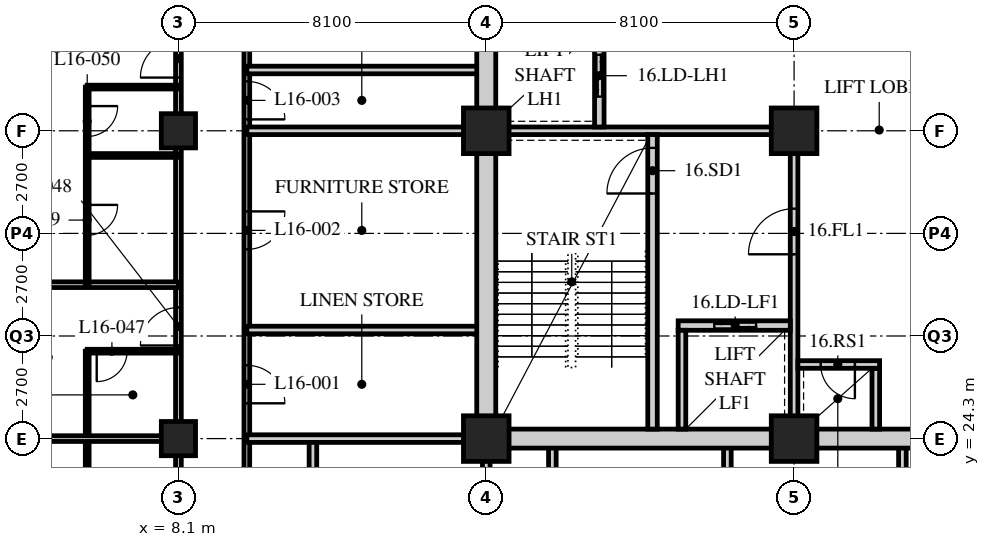
"""IFC4 building model, lengths in metres.
Left out: names, types, materials, properties, quantities, classifications, styles, units other than length and angle.
Written with IfcOpenShell. Run it as: python <this file> out.ifc"""

import sys

from ifc_helpers import new_model, si_unit, direction, frame, frame_2d, origin, origin_2d, place, context, subcontext, project, spatial, rectangle, hollow_rectangle, extrude, element, fill, save


model = new_model("IFC4")
c1 = context("Model", 3, precision=1e-05, world=origin(), true_north=direction((0.0, 1.0)))
c2 = subcontext(c1, "Body", "Model", "MODEL_VIEW")
j1 = project(units=[si_unit("LENGTHUNIT", "METRE"), si_unit("PLANEANGLEUNIT", "RADIAN")], contexts=[c1])
p1 = place(None, origin())
s1 = spatial("IfcSite", under=j1, at=p1, CompositionType="ELEMENT")
p2 = place(p1, origin())
s2 = spatial("IfcBuilding", under=s1, at=p2, CompositionType="ELEMENT")
p3 = place(p2, frame((0.0, 0.0, 67.0)))
s3 = spatial("IfcBuildingStorey", under=s2, at=p3, CompositionType="ELEMENT", Elevation=67.0)
for number, where, z_axis, x_axis in (
    (1, (8.1, 24.3, 0.0), (0.0, 0.0, 1.0), (1.0, 0.0, 0.0)),
    (2, (8.1, 32.4, 0.0), (0.0, 0.0, 1.0), (1.0, 0.0, 0.0)),
):
    element("IfcColumn", number, at=place(p3, frame(where, z_axis=z_axis, x_axis=x_axis)), inside=s3, PredefinedType="COLUMN", context=c2, shape_type="SweptSolid", body=[
        extrude(hollow_rectangle(XDim=0.9, YDim=0.9, WallThickness=0.09, at=origin_2d()), origin(), (0.0, 0.0, 1.0), 3.4),
    ])
for number, where, z_axis, x_axis in (
    (3, (16.2, 24.3, 0.0), (0.0, 0.0, 1.0), (1.0, 0.0, 0.0)),
    (4, (16.2, 32.4, 0.0), (0.0, 0.0, 1.0), (1.0, 0.0, 0.0)),
    (5, (24.3, 24.3, 0.0), (0.0, 0.0, 1.0), (1.0, 0.0, 0.0)),
    (6, (24.3, 32.4, 0.0), (0.0, 0.0, 1.0), (1.0, 0.0, 0.0)),
):
    element("IfcColumn", number, at=place(p3, frame(where, z_axis=z_axis, x_axis=x_axis)), inside=s3, PredefinedType="COLUMN", context=c2, shape_type="SweptSolid", body=[
        extrude(hollow_rectangle(XDim=1.2, YDim=1.2, WallThickness=0.12, at=origin_2d()), origin(), (0.0, 0.0, 1.0), 3.4),
    ])
p4 = place(p3, frame((8.1, 12.15, 0.0), z_axis=(0.0, 0.0, 1.0), x_axis=(0.0, 1.0, 0.0)))
e7 = element("IfcWall", 7, at=p4, inside=s3, PredefinedType="PARTITIONING", context=c2, shape_type="SweptSolid", body=[
    extrude(rectangle(XDim=30.15, YDim=0.15, at=frame_2d((15.075, 0.0))), origin(), (0.0, 0.0, 1.0), 2.578),
])
p5 = place(p4, frame((0.6, 0.0, 0.0)))
e8 = element("IfcOpeningElement", 8, at=p5, cuts=e7, PredefinedType="OPENING", context=c2, shape_type="SweptSolid", body=[
    extrude(rectangle(XDim=1.0, YDim=2.1, at=frame_2d((0.5, 1.05))), frame((0.0, 0.085, 0.0), z_axis=(0.0, -1.0, 0.0), x_axis=(1.0, 0.0, 0.0)), (0.0, 0.0, 1.0), 0.17),
])
p6 = place(p4, frame((6.8, 0.0, 0.0)))
e9 = element("IfcOpeningElement", 9, at=p6, cuts=e7, PredefinedType="OPENING", context=c2, shape_type="SweptSolid", body=[
    extrude(rectangle(XDim=1.0, YDim=2.1, at=frame_2d((0.5, 1.05))), frame((0.0, 0.085, 0.0), z_axis=(0.0, -1.0, 0.0), x_axis=(1.0, 0.0, 0.0)), (0.0, 0.0, 1.0), 0.17),
])
p7 = place(p4, frame((8.7, 0.0, 0.0)))
e10 = element("IfcOpeningElement", 10, at=p7, cuts=e7, PredefinedType="OPENING", context=c2, shape_type="SweptSolid", body=[
    extrude(rectangle(XDim=1.0, YDim=2.1, at=frame_2d((0.5, 1.05))), frame((0.0, 0.085, 0.0), z_axis=(0.0, -1.0, 0.0), x_axis=(1.0, 0.0, 0.0)), (0.0, 0.0, 1.0), 0.17),
])
p8 = place(p4, frame((14.6, 0.0, 0.0)))
e11 = element("IfcOpeningElement", 11, at=p8, cuts=e7, PredefinedType="OPENING", context=c2, shape_type="SweptSolid", body=[
    extrude(rectangle(XDim=1.0, YDim=2.1, at=frame_2d((0.5, 1.05))), frame((0.0, 0.085, 0.0), z_axis=(0.0, -1.0, 0.0), x_axis=(1.0, 0.0, 0.0)), (0.0, 0.0, 1.0), 0.17),
])
p9 = place(p4, frame((21.65, 0.0, 0.0)))
e12 = element("IfcOpeningElement", 12, at=p9, cuts=e7, PredefinedType="OPENING", context=c2, shape_type="SweptSolid", body=[
    extrude(rectangle(XDim=1.0, YDim=2.1, at=frame_2d((0.5, 1.05))), frame((0.0, 0.085, 0.0), z_axis=(0.0, -1.0, 0.0), x_axis=(1.0, 0.0, 0.0)), (0.0, 0.0, 1.0), 0.17),
])
p10 = place(p4, frame((26.75, 0.0, 0.0)))
e13 = element("IfcOpeningElement", 13, at=p10, cuts=e7, PredefinedType="OPENING", context=c2, shape_type="SweptSolid", body=[
    extrude(rectangle(XDim=1.0, YDim=2.1, at=frame_2d((0.5, 1.05))), frame((0.0, 0.085, 0.0), z_axis=(0.0, -1.0, 0.0), x_axis=(1.0, 0.0, 0.0)), (0.0, 0.0, 1.0), 0.17),
])
p11 = place(p3, frame((9.9, 40.5, 0.0), z_axis=(0.0, 0.0, 1.0), x_axis=(0.0, -1.0, 0.0)))
e14 = element("IfcWall", 14, at=p11, inside=s3, PredefinedType="PARTITIONING", context=c2, shape_type="SweptSolid", body=[
    extrude(rectangle(XDim=26.55, YDim=0.15, at=frame_2d((13.275, 0.0))), origin(), (0.0, 0.0, 1.0), 3.19),
])
p12 = place(p11, frame((14.271, 0.0, 0.0)))
e15 = element("IfcOpeningElement", 15, at=p12, cuts=e14, PredefinedType="OPENING", context=c2, shape_type="SweptSolid", body=[
    extrude(rectangle(XDim=1.0, YDim=2.1, at=frame_2d((0.5, 1.05))), frame((0.0, 0.085, 0.0), z_axis=(0.0, -1.0, 0.0), x_axis=(1.0, 0.0, 0.0)), (0.0, 0.0, 1.0), 0.17),
])
p13 = place(p11, frame((10.221, 0.0, 0.0)))
e16 = element("IfcOpeningElement", 16, at=p13, cuts=e14, PredefinedType="OPENING", context=c2, shape_type="SweptSolid", body=[
    extrude(rectangle(XDim=1.0, YDim=2.1, at=frame_2d((0.5, 1.05))), frame((0.0, 0.085, 0.0), z_axis=(0.0, -1.0, 0.0), x_axis=(1.0, 0.0, 0.0)), (0.0, 0.0, 1.0), 0.17),
])
p14 = place(p11, frame((6.8, 0.0, 0.0)))
e17 = element("IfcOpeningElement", 17, at=p14, cuts=e14, PredefinedType="OPENING", context=c2, shape_type="SweptSolid", body=[
    extrude(rectangle(XDim=1.0, YDim=2.1, at=frame_2d((0.5, 1.05))), frame((0.0, 0.085, 0.0), z_axis=(0.0, -1.0, 0.0), x_axis=(1.0, 0.0, 0.0)), (0.0, 0.0, 1.0), 0.17),
])
p15 = place(p11, frame((2.75, 0.0, 0.0)))
e18 = element("IfcOpeningElement", 18, at=p15, cuts=e14, PredefinedType="OPENING", context=c2, shape_type="SweptSolid", body=[
    extrude(rectangle(XDim=1.0, YDim=2.1, at=frame_2d((0.5, 1.05))), frame((0.0, 0.085, 0.0), z_axis=(0.0, -1.0, 0.0), x_axis=(1.0, 0.0, 0.0)), (0.0, 0.0, 1.0), 0.17),
])
p16 = place(p3, frame((9.9, 32.4, 0.0), z_axis=(0.0, 0.0, 1.0), x_axis=(1.0, 0.0, 0.0)))
e19 = element("IfcWall", 19, at=p16, inside=s3, PredefinedType="SOLIDWALL", context=c2, shape_type="SweptSolid", body=[
    extrude(rectangle(XDim=6.3, YDim=0.2, at=frame_2d((3.15, 0.0))), origin(), (0.0, 0.0, 1.0), 2.578),
])
for number, where, z_axis, x_axis in (
    (20, (9.9, 27.157, 0.0), (0.0, 0.0, 1.0), (1.0, 0.0, 0.0)),
    (21, (9.9, 34.0, 0.0), (0.0, 0.0, 1.0), (1.0, 0.0, 0.0)),
):
    element("IfcWall", number, at=place(p3, frame(where, z_axis=z_axis, x_axis=x_axis)), inside=s3, PredefinedType="SOLIDWALL", context=c2, shape_type="SweptSolid", body=[
        extrude(rectangle(XDim=6.3, YDim=0.2, at=frame_2d((3.15, 0.0))), origin(), (0.0, 0.0, 1.0), 3.19),
    ])
p17 = place(p3, frame((16.2, 13.95, 0.0), z_axis=(0.0, 0.0, 1.0), x_axis=(0.0, 1.0, 0.0)))
e22 = element("IfcWall", 22, at=p17, inside=s3, PredefinedType="SOLIDWALL", context=c2, shape_type="SweptSolid", body=[
    extrude(rectangle(XDim=10.35, YDim=0.2, at=frame_2d((5.175, 0.0))), origin(), (0.0, 0.0, 1.0), 2.578),
])
for number, where, z_axis, x_axis in (
    (23, (11.639, 13.95, 0.0), (0.0, 0.0, 1.0), (0.0, 1.0, 0.0)),
    (24, (17.939, 13.95, 0.0), (0.0, 0.0, 1.0), (0.0, 1.0, 0.0)),
    (25, (22.545, 13.95, 0.0), (0.0, 0.0, 1.0), (0.0, 1.0, 0.0)),
    (26, (27.15, 13.95, 0.0), (0.0, 0.0, 1.0), (0.0, 1.0, 0.0)),
):
    element("IfcWall", number, at=place(p3, frame(where, z_axis=z_axis, x_axis=x_axis)), inside=s3, PredefinedType="SOLIDWALL", context=c2, shape_type="SweptSolid", body=[
        extrude(rectangle(XDim=10.35, YDim=0.2, at=frame_2d((5.175, 0.0))), origin(), (0.0, 0.0, 1.0), 3.19),
    ])
p18 = place(p3, frame((9.9, 24.3, 0.0), z_axis=(0.0, 0.0, 1.0), x_axis=(1.0, 0.0, 0.0)))
e27 = element("IfcWall", 27, at=p18, inside=s3, PredefinedType="SOLIDWALL", context=c2, shape_type="SweptSolid", body=[
    extrude(rectangle(XDim=6.3, YDim=0.2, at=frame_2d((3.15, 0.0))), origin(), (0.0, 0.0, 1.0), 2.578),
])
p19 = place(p3, frame((5.7, 22.0, 0.0), z_axis=(0.0, 0.0, 1.0), x_axis=(0.0, 1.0, 0.0)))
e28 = element("IfcWall", 28, at=p19, inside=s3, PredefinedType="PARTITIONING", context=c2, shape_type="SweptSolid", body=[
    extrude(rectangle(XDim=4.6, YDim=0.1, at=frame_2d((2.3, 0.0))), origin(), (0.0, 0.0, 1.0), 3.19),
])
p20 = place(p3, frame((8.1, 24.3, 0.0), z_axis=(0.0, 0.0, 1.0), x_axis=(-1.0, 0.0, 0.0)))
e29 = element("IfcWall", 29, at=p20, inside=s3, PredefinedType="PARTITIONING", context=c2, shape_type="SweptSolid", body=[
    extrude(rectangle(XDim=7.8, YDim=0.15, at=frame_2d((3.9, 0.0))), origin(), (0.0, 0.0, 1.0), 2.578),
])
p21 = place(p3, frame((8.1, 26.6, 0.0), z_axis=(0.0, 0.0, 1.0), x_axis=(-1.0, 0.0, 0.0)))
e30 = element("IfcWall", 30, at=p21, inside=s3, PredefinedType="PARTITIONING", context=c2, shape_type="SweptSolid", body=[
    extrude(rectangle(XDim=2.4, YDim=0.1, at=frame_2d((1.2, 0.0))), origin(), (0.0, 0.0, 1.0), 3.19),
])
p22 = place(p21, frame((1.35, 0.0, 0.0)))
e31 = element("IfcOpeningElement", 31, at=p22, cuts=e30, PredefinedType="OPENING", context=c2, shape_type="SweptSolid", body=[
    extrude(rectangle(XDim=0.8, YDim=2.1, at=frame_2d((0.4, 1.05))), frame((0.0, 0.06, 0.0), z_axis=(0.0, -1.0, 0.0), x_axis=(1.0, 0.0, 0.0)), (0.0, 0.0, 1.0), 0.12),
])
p23 = place(p3, frame((8.1, 28.35, 0.0), z_axis=(0.0, 0.0, 1.0), x_axis=(-1.0, 0.0, 0.0)))
e32 = element("IfcWall", 32, at=p23, inside=s3, PredefinedType="PARTITIONING", context=c2, shape_type="SweptSolid", body=[
    extrude(rectangle(XDim=7.8, YDim=0.15, at=frame_2d((3.9, 0.0))), origin(), (0.0, 0.0, 1.0), 3.19),
])
p24 = place(p3, frame((5.7, 28.35, 0.0), z_axis=(0.0, 0.0, 1.0), x_axis=(0.0, 1.0, 0.0)))
e33 = element("IfcWall", 33, at=p24, inside=s3, PredefinedType="PARTITIONING", context=c2, shape_type="SweptSolid", body=[
    extrude(rectangle(XDim=5.2, YDim=0.1, at=frame_2d((2.6, 0.0))), origin(), (0.0, 0.0, 1.0), 3.19),
])
p25 = place(p24, frame((1.3, 0.0, 0.0)))
e34 = element("IfcOpeningElement", 34, at=p25, cuts=e33, PredefinedType="OPENING", context=c2, shape_type="SweptSolid", body=[
    extrude(rectangle(XDim=0.8, YDim=2.1, at=frame_2d((0.4, 1.05))), frame((0.0, 0.06, 0.0), z_axis=(0.0, -1.0, 0.0), x_axis=(1.0, 0.0, 0.0)), (0.0, 0.0, 1.0), 0.12),
])
p26 = place(p24, frame((3.9, 0.0, 0.0)))
e35 = element("IfcOpeningElement", 35, at=p26, cuts=e33, PredefinedType="OPENING", context=c2, shape_type="SweptSolid", body=[
    extrude(rectangle(XDim=0.8, YDim=2.1, at=frame_2d((0.4, 1.05))), frame((0.0, 0.06, 0.0), z_axis=(0.0, -1.0, 0.0), x_axis=(1.0, 0.0, 0.0)), (0.0, 0.0, 1.0), 0.12),
])
for number, where, z_axis, x_axis in (
    (36, (8.1, 31.75, 0.0), (0.0, 0.0, 1.0), (-1.0, 0.0, 0.0)),
    (37, (8.1, 33.55, 0.0), (0.0, 0.0, 1.0), (-1.0, 0.0, 0.0)),
):
    element("IfcWall", number, at=place(p3, frame(where, z_axis=z_axis, x_axis=x_axis)), inside=s3, PredefinedType="PARTITIONING", context=c2, shape_type="SweptSolid", body=[
        extrude(rectangle(XDim=2.4, YDim=0.1, at=frame_2d((1.2, 0.0))), origin(), (0.0, 0.0, 1.0), 3.19),
    ])
p27 = place(p3, frame((15.95, 24.3, 0.0), z_axis=(0.0, 0.0, 1.0), x_axis=(1.0, 0.0, 0.0)))
e38 = element("IfcWall", 38, at=p27, inside=s3, PredefinedType="SOLIDWALL", context=c2, shape_type="SweptSolid", body=[
    extrude(rectangle(XDim=24.8, YDim=0.5, at=frame_2d((12.4, 0.0))), origin(), (0.0, 0.0, 1.0), 2.54),
])
p28 = place(p27, frame((11.5, 0.0, 0.0)))
e39 = element("IfcOpeningElement", 39, at=p28, cuts=e38, PredefinedType="OPENING", context=c2, shape_type="SweptSolid", body=[
    extrude(rectangle(XDim=1.8, YDim=2.4, at=frame_2d((0.9, 1.2))), frame((0.0, 0.26, 0.0), z_axis=(0.0, -1.0, 0.0), x_axis=(1.0, 0.0, 0.0)), (0.0, 0.0, 1.0), 0.52),
])
p29 = place(p3, frame((16.2, 24.55, 0.0), z_axis=(0.0, 0.0, 1.0), x_axis=(0.0, 1.0, 0.0)))
e40 = element("IfcWall", 40, at=p29, inside=s3, PredefinedType="SOLIDWALL", context=c2, shape_type="SweptSolid", body=[
    extrude(rectangle(XDim=15.7, YDim=0.5, at=frame_2d((7.85, 0.0))), origin(), (0.0, 0.0, 1.0), 2.578),
])
p30 = place(p3, frame((16.45, 32.4, 0.0), z_axis=(0.0, 0.0, 1.0), x_axis=(1.0, 0.0, 0.0)))
e41 = element("IfcWall", 41, at=p30, inside=s3, PredefinedType="SOLIDWALL", context=c2, shape_type="SweptSolid", body=[
    extrude(rectangle(XDim=7.95, YDim=0.2, at=frame_2d((3.975, 0.0))), origin(), (0.0, 0.0, 1.0), 2.578),
])
p31 = place(p3, frame((24.3, 24.55, 0.0), z_axis=(0.0, 0.0, 1.0), x_axis=(0.0, 1.0, 0.0)))
e42 = element("IfcWall", 42, at=p31, inside=s3, PredefinedType="SOLIDWALL", context=c2, shape_type="SweptSolid", body=[
    extrude(rectangle(XDim=7.75, YDim=0.2, at=frame_2d((3.875, 0.0))), origin(), (0.0, 0.0, 1.0), 2.578),
])
p32 = place(p31, frame((4.6, 0.0, 0.0)))
e43 = element("IfcOpeningElement", 43, at=p32, cuts=e42, PredefinedType="OPENING", context=c2, shape_type="SweptSolid", body=[
    extrude(rectangle(XDim=1.2, YDim=2.1, at=frame_2d((0.6, 1.05))), frame((0.0, 0.11, 0.0), z_axis=(0.0, -1.0, 0.0), x_axis=(1.0, 0.0, 0.0)), (0.0, 0.0, 1.0), 0.22),
])
p33 = place(p3, frame((20.575, 24.55, 0.0), z_axis=(0.0, 0.0, 1.0), x_axis=(0.0, 1.0, 0.0)))
e44 = element("IfcWall", 44, at=p33, inside=s3, PredefinedType="SOLIDWALL", context=c2, shape_type="SweptSolid", body=[
    extrude(rectangle(XDim=7.75, YDim=0.25, at=frame_2d((3.875, 0.0))), origin(), (0.0, 0.0, 1.0), 3.19),
])
p34 = place(p33, frame((6.2, 0.0, 0.0)))
e45 = element("IfcOpeningElement", 45, at=p34, cuts=e44, PredefinedType="OPENING", context=c2, shape_type="SweptSolid", body=[
    extrude(rectangle(XDim=1.2, YDim=2.1, at=frame_2d((0.6, 1.05))), frame((0.0, 0.135, 0.0), z_axis=(0.0, -1.0, 0.0), x_axis=(1.0, 0.0, 0.0)), (0.0, 0.0, 1.0), 0.27),
])
p35 = place(p3, frame((21.25, 27.275, 0.0), z_axis=(0.0, 0.0, 1.0), x_axis=(1.0, 0.0, 0.0)))
e46 = element("IfcWall", 46, at=p35, inside=s3, PredefinedType="SOLIDWALL", context=c2, shape_type="SweptSolid", body=[
    extrude(rectangle(XDim=2.95, YDim=0.25, at=frame_2d((1.475, 0.0))), origin(), (0.0, 0.0, 1.0), 3.19),
])
p36 = place(p35, frame((0.95, 0.0, 0.0)))
e47 = element("IfcOpeningElement", 47, at=p36, cuts=e46, PredefinedType="OPENING", context=c2, shape_type="SweptSolid", body=[
    extrude(rectangle(XDim=1.1, YDim=2.4, at=frame_2d((0.55, 1.2))), frame((0.0, 0.135, 0.0), z_axis=(0.0, -1.0, 0.0), x_axis=(1.0, 0.0, 0.0)), (0.0, 0.0, 1.0), 0.27),
])
p37 = place(p3, frame((21.35, 24.55, 0.0), z_axis=(0.0, 0.0, 1.0), x_axis=(0.0, 1.0, 0.0)))
e48 = element("IfcWall", 48, at=p37, inside=s3, PredefinedType="SOLIDWALL", context=c2, shape_type="SweptSolid", body=[
    extrude(rectangle(XDim=2.6, YDim=0.2, at=frame_2d((1.3, 0.0))), origin(), (0.0, 0.0, 1.0), 3.19),
])
p38 = place(p3, frame((19.175, 32.5, 0.0), z_axis=(0.0, 0.0, 1.0), x_axis=(0.0, 1.0, 0.0)))
e49 = element("IfcWall", 49, at=p38, inside=s3, PredefinedType="SOLIDWALL", context=c2, shape_type="SweptSolid", body=[
    extrude(rectangle(XDim=7.75, YDim=0.25, at=frame_2d((3.875, 0.0))), origin(), (0.0, 0.0, 1.0), 3.19),
])
p39 = place(p38, frame((0.8, 0.0, 0.0)))
e50 = element("IfcOpeningElement", 50, at=p39, cuts=e49, PredefinedType="OPENING", context=c2, shape_type="SweptSolid", body=[
    extrude(rectangle(XDim=1.1, YDim=2.4, at=frame_2d((0.55, 1.2))), frame((0.0, 0.135, 0.0), z_axis=(0.0, -1.0, 0.0), x_axis=(1.0, 0.0, 0.0)), (0.0, 0.0, 1.0), 0.27),
])
p40 = place(p38, frame((3.4, 0.0, 0.0)))
e51 = element("IfcOpeningElement", 51, at=p40, cuts=e49, PredefinedType="OPENING", context=c2, shape_type="SweptSolid", body=[
    extrude(rectangle(XDim=1.1, YDim=2.4, at=frame_2d((0.55, 1.2))), frame((0.0, 0.135, 0.0), z_axis=(0.0, -1.0, 0.0), x_axis=(1.0, 0.0, 0.0)), (0.0, 0.0, 1.0), 0.27),
])
p41 = place(p38, frame((6.0, 0.0, 0.0)))
e52 = element("IfcOpeningElement", 52, at=p41, cuts=e49, PredefinedType="OPENING", context=c2, shape_type="SweptSolid", body=[
    extrude(rectangle(XDim=1.1, YDim=2.4, at=frame_2d((0.55, 1.2))), frame((0.0, 0.135, 0.0), z_axis=(0.0, -1.0, 0.0), x_axis=(1.0, 0.0, 0.0)), (0.0, 0.0, 1.0), 0.27),
])
p42 = place(p3, frame((26.45, 24.55, 0.0), z_axis=(0.0, 0.0, 1.0), x_axis=(0.0, 1.0, 0.0)))
e53 = element("IfcWall", 53, at=p42, inside=s3, PredefinedType="SOLIDWALL", context=c2, shape_type="SweptSolid", body=[
    extrude(rectangle(XDim=1.6, YDim=0.2, at=frame_2d((0.8, 0.0))), origin(), (0.0, 0.0, 1.0), 3.19),
])
p43 = place(p3, frame((24.4, 26.25, 0.0), z_axis=(0.0, 0.0, 1.0), x_axis=(1.0, 0.0, 0.0)))
e54 = element("IfcWall", 54, at=p43, inside=s3, PredefinedType="SOLIDWALL", context=c2, shape_type="SweptSolid", body=[
    extrude(rectangle(XDim=2.15, YDim=0.2, at=frame_2d((1.075, 0.0))), origin(), (0.0, 0.0, 1.0), 3.19),
])
p44 = place(p43, frame((0.6, 0.0, 0.0)))
e55 = element("IfcOpeningElement", 55, at=p44, cuts=e54, PredefinedType="OPENING", context=c2, shape_type="SweptSolid", body=[
    extrude(rectangle(XDim=0.9, YDim=2.1, at=frame_2d((0.45, 1.05))), frame((0.0, 0.11, 0.0), z_axis=(0.0, -1.0, 0.0), x_axis=(1.0, 0.0, 0.0)), (0.0, 0.0, 1.0), 0.22),
])
p45 = place(p12, origin())
e56 = element("IfcDoor", 56, at=p45, inside=s3, OperationType="SINGLE_SWING_RIGHT", PredefinedType="DOOR", context=c2, shape_type="SweptSolid", body=[
    extrude(rectangle(XDim=1.0, YDim=2.1, at=frame_2d((0.5, 1.05))), frame((0.0, 0.025, 0.0), z_axis=(0.0, -1.0, 0.0), x_axis=(1.0, 0.0, 0.0)), (0.0, 0.0, 1.0), 0.05),
])
fill(e15, e56)
p46 = place(p13, origin())
e57 = element("IfcDoor", 57, at=p46, inside=s3, OperationType="SINGLE_SWING_LEFT", PredefinedType="DOOR", context=c2, shape_type="SweptSolid", body=[
    extrude(rectangle(XDim=1.0, YDim=2.1, at=frame_2d((0.5, 1.05))), frame((0.0, 0.025, 0.0), z_axis=(0.0, -1.0, 0.0), x_axis=(1.0, 0.0, 0.0)), (0.0, 0.0, 1.0), 0.05),
])
fill(e16, e57)
p47 = place(p14, origin())
e58 = element("IfcDoor", 58, at=p47, inside=s3, OperationType="SINGLE_SWING_RIGHT", PredefinedType="DOOR", context=c2, shape_type="SweptSolid", body=[
    extrude(rectangle(XDim=1.0, YDim=2.1, at=frame_2d((0.5, 1.05))), frame((0.0, 0.025, 0.0), z_axis=(0.0, -1.0, 0.0), x_axis=(1.0, 0.0, 0.0)), (0.0, 0.0, 1.0), 0.05),
])
fill(e17, e58)
p48 = place(p22, origin())
e59 = element("IfcDoor", 59, at=p48, inside=s3, OperationType="SINGLE_SWING_RIGHT", PredefinedType="DOOR", context=c2, shape_type="SweptSolid", body=[
    extrude(rectangle(XDim=0.8, YDim=2.1, at=frame_2d((0.4, 1.05))), frame((0.0, 0.025, 0.0), z_axis=(0.0, -1.0, 0.0), x_axis=(1.0, 0.0, 0.0)), (0.0, 0.0, 1.0), 0.05),
])
fill(e31, e59)
p49 = place(p8, origin())
e60 = element("IfcDoor", 60, at=p49, inside=s3, OperationType="SINGLE_SWING_LEFT", PredefinedType="DOOR", context=c2, shape_type="SweptSolid", body=[
    extrude(rectangle(XDim=1.0, YDim=2.1, at=frame_2d((0.5, 1.05))), frame((0.0, 0.025, 0.0), z_axis=(0.0, -1.0, 0.0), x_axis=(1.0, 0.0, 0.0)), (0.0, 0.0, 1.0), 0.05),
])
fill(e11, e60)
p50 = place(p25, origin())
e61 = element("IfcDoor", 61, at=p50, inside=s3, OperationType="SINGLE_SWING_LEFT", PredefinedType="DOOR", context=c2, shape_type="SweptSolid", body=[
    extrude(rectangle(XDim=0.8, YDim=2.1, at=frame_2d((0.4, 1.05))), frame((0.0, 0.025, 0.0), z_axis=(0.0, -1.0, 0.0), x_axis=(1.0, 0.0, 0.0)), (0.0, 0.0, 1.0), 0.05),
])
fill(e34, e61)
p51 = place(p26, origin())
e62 = element("IfcDoor", 62, at=p51, inside=s3, OperationType="SINGLE_SWING_LEFT", PredefinedType="DOOR", context=c2, shape_type="SweptSolid", body=[
    extrude(rectangle(XDim=0.8, YDim=2.1, at=frame_2d((0.4, 1.05))), frame((0.0, 0.025, 0.0), z_axis=(0.0, -1.0, 0.0), x_axis=(1.0, 0.0, 0.0)), (0.0, 0.0, 1.0), 0.05),
])
fill(e35, e62)
p52 = place(p9, origin())
e63 = element("IfcDoor", 63, at=p52, inside=s3, OperationType="SINGLE_SWING_LEFT", PredefinedType="DOOR", context=c2, shape_type="SweptSolid", body=[
    extrude(rectangle(XDim=1.0, YDim=2.1, at=frame_2d((0.5, 1.05))), frame((0.0, 0.025, 0.0), z_axis=(0.0, -1.0, 0.0), x_axis=(1.0, 0.0, 0.0)), (0.0, 0.0, 1.0), 0.05),
])
fill(e12, e63)
p53 = place(p34, origin())
e64 = element("IfcDoor", 64, at=p53, inside=s3, OperationType="SINGLE_SWING_LEFT", PredefinedType="DOOR", context=c2, shape_type="SweptSolid", body=[
    extrude(rectangle(XDim=1.2, YDim=2.1, at=frame_2d((0.6, 1.05))), frame((0.0, 0.025, 0.0), z_axis=(0.0, -1.0, 0.0), x_axis=(1.0, 0.0, 0.0)), (0.0, 0.0, 1.0), 0.05),
])
fill(e45, e64)
p54 = place(p32, origin())
e65 = element("IfcDoor", 65, at=p54, inside=s3, OperationType="SINGLE_SWING_LEFT", PredefinedType="DOOR", context=c2, shape_type="SweptSolid", body=[
    extrude(rectangle(XDim=1.2, YDim=2.1, at=frame_2d((0.6, 1.05))), frame((0.0, 0.025, 0.0), z_axis=(0.0, -1.0, 0.0), x_axis=(1.0, 0.0, 0.0)), (0.0, 0.0, 1.0), 0.05),
])
fill(e43, e65)
p55 = place(p44, origin())
e66 = element("IfcDoor", 66, at=p55, inside=s3, OperationType="SINGLE_SWING_LEFT", PredefinedType="DOOR", context=c2, shape_type="SweptSolid", body=[
    extrude(rectangle(XDim=0.9, YDim=2.1, at=frame_2d((0.45, 1.05))), frame((0.0, 0.025, 0.0), z_axis=(0.0, -1.0, 0.0), x_axis=(1.0, 0.0, 0.0)), (0.0, 0.0, 1.0), 0.05),
])
fill(e55, e66)
p56 = place(p39, origin())
e67 = element("IfcDoor", 67, at=p56, inside=s3, OperationType="DOUBLE_DOOR_SLIDING", PredefinedType="DOOR", context=c2, shape_type="SweptSolid", body=[
    extrude(rectangle(XDim=1.1, YDim=2.4, at=frame_2d((0.55, 1.2))), frame((0.0, 0.025, 0.0), z_axis=(0.0, -1.0, 0.0), x_axis=(1.0, 0.0, 0.0)), (0.0, 0.0, 1.0), 0.05),
])
fill(e50, e67)
p57 = place(p36, origin())
e68 = element("IfcDoor", 68, at=p57, inside=s3, OperationType="DOUBLE_DOOR_SLIDING", PredefinedType="DOOR", context=c2, shape_type="SweptSolid", body=[
    extrude(rectangle(XDim=1.1, YDim=2.4, at=frame_2d((0.55, 1.2))), frame((0.0, 0.025, 0.0), z_axis=(0.0, -1.0, 0.0), x_axis=(1.0, 0.0, 0.0)), (0.0, 0.0, 1.0), 0.05),
])
fill(e47, e68)
save(model, sys.argv[1])
